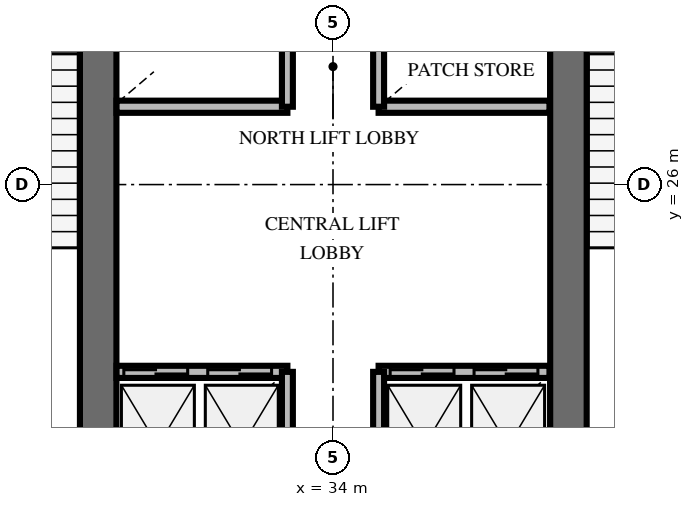
"""IFC4 building model, lengths in metres.
Left out: names, types, materials, properties, quantities, classifications, styles, units other than length and angle.
Written with IfcOpenShell. Run it as: python <this file> out.ifc"""

import sys

from ifc_helpers import new_model, si_unit, direction, frame, frame_2d, origin, place, context, subcontext, project, spatial, rectangle, extrude, element, fill, save


model = new_model("IFC4")
c1 = context("Model", 3, precision=1e-05, world=origin(), true_north=direction((0.0, 1.0)))
c2 = subcontext(c1, "Body", "Model", "MODEL_VIEW")
j1 = project(units=[si_unit("LENGTHUNIT", "METRE"), si_unit("PLANEANGLEUNIT", "RADIAN")], contexts=[c1])
p1 = place(None, origin())
s1 = spatial("IfcSite", under=j1, at=p1, CompositionType="ELEMENT")
p2 = place(p1, origin())
s2 = spatial("IfcBuilding", under=s1, at=p2, CompositionType="ELEMENT")
p3 = place(p2, frame((0.0, 0.0, 84.6)))
s3 = spatial("IfcBuildingStorey", under=s2, at=p3, CompositionType="ELEMENT", Elevation=84.6)
for number, where, z_axis, x_axis in (
    (1, (30.138, 20.112, 0.0), (0.0, 0.0, 1.0), (0.0, 1.0, 0.0)),
    (2, (37.872, 20.112, 0.0), (0.0, 0.0, 1.0), (0.0, 1.0, 0.0)),
):
    element("IfcWall", number, at=place(p3, frame(where, z_axis=z_axis, x_axis=x_axis)), inside=s3, PredefinedType="SHEAR", context=c2, shape_type="SweptSolid", body=[
        extrude(rectangle(XDim=9.976, YDim=0.6, at=frame_2d((4.988, 0.0))), origin(), (0.0, 0.0, 1.0), 4.2),
    ])
p4 = place(p3, frame((30.44, 22.92, 0.0), z_axis=(0.0, 0.0, 1.0), x_axis=(1.0, 0.0, 0.0)))
e3 = element("IfcWall", 3, at=p4, inside=s3, PredefinedType="SOLIDWALL", context=c2, shape_type="SweptSolid", body=[
    extrude(rectangle(XDim=2.81, YDim=0.2, at=frame_2d((1.405, 0.0))), origin(), (0.0, 0.0, 1.0), 2.96),
])
p5 = place(p4, frame((0.12, 0.0, 0.0)))
e4 = element("IfcOpeningElement", 4, at=p5, cuts=e3, PredefinedType="OPENING", context=c2, shape_type="SweptSolid", body=[
    extrude(rectangle(XDim=1.05, YDim=2.1, at=frame_2d((0.525, 1.05))), frame((0.0, 0.11, 0.0), z_axis=(0.0, -1.0, 0.0), x_axis=(1.0, 0.0, 0.0)), (0.0, 0.0, 1.0), 0.22),
])
p6 = place(p4, frame((1.5, 0.0, 0.0)))
e5 = element("IfcOpeningElement", 5, at=p6, cuts=e3, PredefinedType="OPENING", context=c2, shape_type="SweptSolid", body=[
    extrude(rectangle(XDim=1.05, YDim=2.1, at=frame_2d((0.525, 1.05))), frame((0.0, 0.11, 0.0), z_axis=(0.0, -1.0, 0.0), x_axis=(1.0, 0.0, 0.0)), (0.0, 0.0, 1.0), 0.22),
])
p7 = place(p3, frame((33.25, 20.5, 0.0), z_axis=(0.0, 0.0, 1.0), x_axis=(0.0, 1.0, 0.0)))
e6 = element("IfcWall", 6, at=p7, inside=s3, PredefinedType="SOLIDWALL", context=c2, shape_type="SweptSolid", body=[
    extrude(rectangle(XDim=2.42, YDim=0.18, at=frame_2d((1.21, 0.0))), origin(), (0.0, 0.0, 1.0), 2.96),
])
p8 = place(p3, frame((34.75, 22.92, 0.0), z_axis=(0.0, 0.0, 1.0), x_axis=(1.0, 0.0, 0.0)))
e7 = element("IfcWall", 7, at=p8, inside=s3, PredefinedType="SOLIDWALL", context=c2, shape_type="SweptSolid", body=[
    extrude(rectangle(XDim=2.81, YDim=0.2, at=frame_2d((1.405, 0.0))), origin(), (0.0, 0.0, 1.0), 2.96),
])
p9 = place(p8, frame((0.19, 0.0, 0.0)))
e8 = element("IfcOpeningElement", 8, at=p9, cuts=e7, PredefinedType="OPENING", context=c2, shape_type="SweptSolid", body=[
    extrude(rectangle(XDim=1.05, YDim=2.1, at=frame_2d((0.525, 1.05))), frame((0.0, 0.11, 0.0), z_axis=(0.0, -1.0, 0.0), x_axis=(1.0, 0.0, 0.0)), (0.0, 0.0, 1.0), 0.22),
])
p10 = place(p8, frame((1.57, 0.0, 0.0)))
e9 = element("IfcOpeningElement", 9, at=p10, cuts=e7, PredefinedType="OPENING", context=c2, shape_type="SweptSolid", body=[
    extrude(rectangle(XDim=1.05, YDim=2.1, at=frame_2d((0.525, 1.05))), frame((0.0, 0.11, 0.0), z_axis=(0.0, -1.0, 0.0), x_axis=(1.0, 0.0, 0.0)), (0.0, 0.0, 1.0), 0.22),
])
p11 = place(p3, frame((34.75, 20.5, 0.0), z_axis=(0.0, 0.0, 1.0), x_axis=(0.0, 1.0, 0.0)))
e10 = element("IfcWall", 10, at=p11, inside=s3, PredefinedType="SOLIDWALL", context=c2, shape_type="SweptSolid", body=[
    extrude(rectangle(XDim=2.42, YDim=0.18, at=frame_2d((1.21, 0.0))), origin(), (0.0, 0.0, 1.0), 2.96),
])
p12 = place(p3, frame((30.44, 27.28, 0.0), z_axis=(0.0, 0.0, 1.0), x_axis=(1.0, 0.0, 0.0)))
e11 = element("IfcWall", 11, at=p12, inside=s3, PredefinedType="SOLIDWALL", context=c2, shape_type="SweptSolid", body=[
    extrude(rectangle(XDim=2.81, YDim=0.2, at=frame_2d((1.405, 0.0))), origin(), (0.0, 0.0, 1.0), 2.96),
])
p13 = place(p3, frame((33.25, 27.28, 0.0), z_axis=(0.0, 0.0, 1.0), x_axis=(0.0, 1.0, 0.0)))
e12 = element("IfcWall", 12, at=p13, inside=s3, PredefinedType="SOLIDWALL", context=c2, shape_type="SweptSolid", body=[
    extrude(rectangle(XDim=2.47, YDim=0.18, at=frame_2d((1.235, 0.0))), origin(), (0.0, 0.0, 1.0), 2.96),
])
p14 = place(p3, frame((34.75, 27.28, 0.0), z_axis=(0.0, 0.0, 1.0), x_axis=(1.0, 0.0, 0.0)))
e13 = element("IfcWall", 13, at=p14, inside=s3, PredefinedType="SOLIDWALL", context=c2, shape_type="SweptSolid", body=[
    extrude(rectangle(XDim=2.81, YDim=0.2, at=frame_2d((1.405, 0.0))), origin(), (0.0, 0.0, 1.0), 2.96),
])
p15 = place(p3, frame((34.75, 27.28, 0.0), z_axis=(0.0, 0.0, 1.0), x_axis=(0.0, 1.0, 0.0)))
e14 = element("IfcWall", 14, at=p15, inside=s3, PredefinedType="SOLIDWALL", context=c2, shape_type="SweptSolid", body=[
    extrude(rectangle(XDim=2.47, YDim=0.18, at=frame_2d((1.235, 0.0))), origin(), (0.0, 0.0, 1.0), 2.96),
])
p16 = place(p5, origin())
e15 = element("IfcDoor", 15, at=p16, inside=s3, OperationType="DOUBLE_DOOR_SLIDING", PredefinedType="USERDEFINED", context=c2, shape_type="SweptSolid", body=[
    extrude(rectangle(XDim=1.05, YDim=2.1, at=frame_2d((0.525, 1.05))), frame((0.0, 0.025, 0.0), z_axis=(0.0, -1.0, 0.0), x_axis=(1.0, 0.0, 0.0)), (0.0, 0.0, 1.0), 0.05),
])
fill(e4, e15)
p17 = place(p6, origin())
e16 = element("IfcDoor", 16, at=p17, inside=s3, OperationType="DOUBLE_DOOR_SLIDING", PredefinedType="USERDEFINED", context=c2, shape_type="SweptSolid", body=[
    extrude(rectangle(XDim=1.05, YDim=2.1, at=frame_2d((0.525, 1.05))), frame((0.0, 0.025, 0.0), z_axis=(0.0, -1.0, 0.0), x_axis=(1.0, 0.0, 0.0)), (0.0, 0.0, 1.0), 0.05),
])
fill(e5, e16)
p18 = place(p9, origin())
e17 = element("IfcDoor", 17, at=p18, inside=s3, OperationType="DOUBLE_DOOR_SLIDING", PredefinedType="USERDEFINED", context=c2, shape_type="SweptSolid", body=[
    extrude(rectangle(XDim=1.05, YDim=2.1, at=frame_2d((0.525, 1.05))), frame((0.0, 0.025, 0.0), z_axis=(0.0, -1.0, 0.0), x_axis=(1.0, 0.0, 0.0)), (0.0, 0.0, 1.0), 0.05),
])
fill(e8, e17)
p19 = place(p10, origin())
e18 = element("IfcDoor", 18, at=p19, inside=s3, OperationType="DOUBLE_DOOR_SLIDING", PredefinedType="USERDEFINED", context=c2, shape_type="SweptSolid", body=[
    extrude(rectangle(XDim=1.05, YDim=2.1, at=frame_2d((0.525, 1.05))), frame((0.0, 0.025, 0.0), z_axis=(0.0, -1.0, 0.0), x_axis=(1.0, 0.0, 0.0)), (0.0, 0.0, 1.0), 0.05),
])
fill(e9, e18)
save(model, sys.argv[1])
